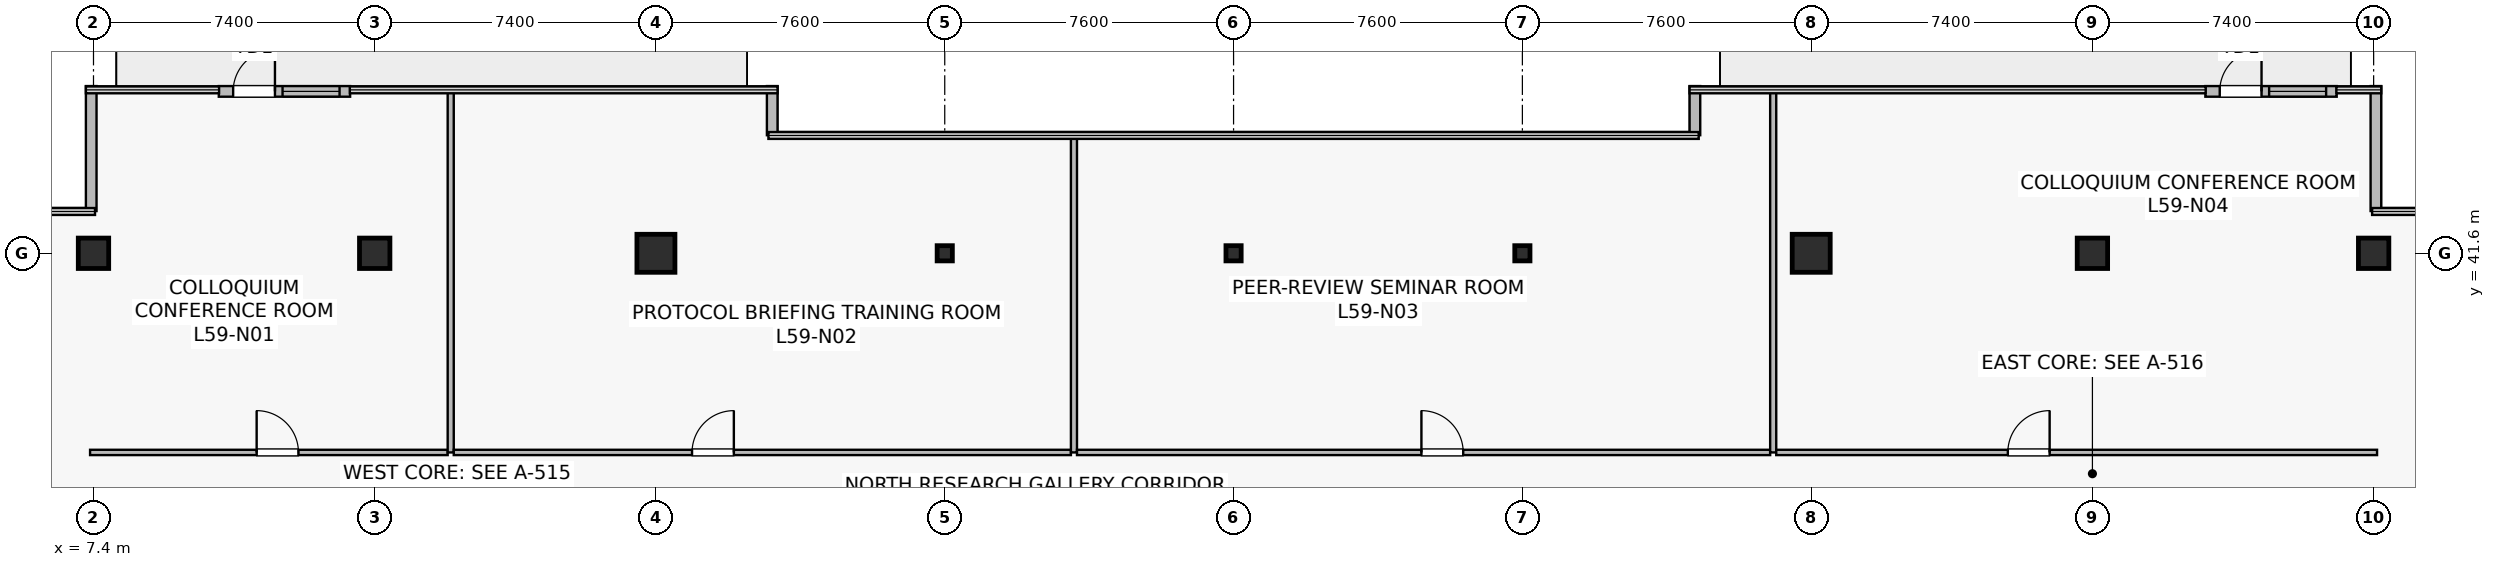
"""IFC4 building model, lengths in metres.
Left out: names, types, materials, properties, quantities, classifications, styles, units other than length and angle.
Written with IfcOpenShell. Run it as: python <this file> out.ifc"""

import sys

from ifc_helpers import new_model, si_unit, direction, frame, frame_2d, origin, origin_2d, place, context, subcontext, project, spatial, rectangle, hollow_rectangle, extrude, source, transform, mapped, element, fill, save


model = new_model("IFC4")
c1 = context("Model", 3, precision=1e-05, world=origin(), true_north=direction((0.0, 1.0)))
c2 = subcontext(c1, "Body", "Model", "MODEL_VIEW")
j1 = project(units=[si_unit("LENGTHUNIT", "METRE"), si_unit("PLANEANGLEUNIT", "RADIAN")], contexts=[c1])
p1 = place(None, origin())
s1 = spatial("IfcSite", under=j1, at=p1, CompositionType="ELEMENT")
p2 = place(p1, origin())
s2 = spatial("IfcBuilding", under=s1, at=p2, CompositionType="ELEMENT")
p3 = place(p2, frame((0.0, 0.0, 246.5)))
s3 = spatial("IfcBuildingStorey", under=s2, at=p3, CompositionType="ELEMENT", Elevation=246.5)
m1 = source(origin(), c2, "Body", "SweptSolid", [
    extrude(rectangle(XDim=0.8, YDim=0.8, at=origin_2d()), origin(), (0.0, 0.0, 1.0), 4.1),
])
p4 = place(p3, frame((14.8, 41.6, 0.0), z_axis=(0.0, 0.0, 1.0), x_axis=(1.0, 0.0, 0.0)))
e1 = element("IfcColumn", 1, at=p4, inside=s3, PredefinedType="COLUMN", context=c2, shape_type="MappedRepresentation", body=[
    mapped(m1, transform((0.0, 0.0, 0.0), scale=1.0)),
])
m2 = source(origin(), c2, "Body", "SweptSolid", [
    extrude(rectangle(XDim=1.0, YDim=1.0, at=origin_2d()), origin(), (0.0, 0.0, 1.0), 4.1),
])
for number, where, z_axis, x_axis in (
    (2, (22.2, 41.6, 0.0), (0.0, 0.0, 1.0), (1.0, 0.0, 0.0)),
    (3, (52.6, 41.6, 0.0), (0.0, 0.0, 1.0), (1.0, 0.0, 0.0)),
):
    element("IfcColumn", number, at=place(p3, frame(where, z_axis=z_axis, x_axis=x_axis)), inside=s3, PredefinedType="COLUMN", context=c2, shape_type="MappedRepresentation", body=[
        mapped(m2, transform((0.0, 0.0, 0.0), scale=1.0)),
    ])
for number, where, z_axis, x_axis in (
    (4, (60.0, 41.6, 0.0), (0.0, 0.0, 1.0), (1.0, 0.0, 0.0)),
    (5, (7.4, 41.6, 0.0), (0.0, 0.0, 1.0), (1.0, 0.0, 0.0)),
    (6, (67.4, 41.6, 0.0), (0.0, 0.0, 1.0), (1.0, 0.0, 0.0)),
):
    element("IfcColumn", number, at=place(p3, frame(where, z_axis=z_axis, x_axis=x_axis)), inside=s3, PredefinedType="COLUMN", context=c2, shape_type="MappedRepresentation", body=[
        mapped(m1, transform((0.0, 0.0, 0.0), scale=1.0)),
    ])
m3 = source(origin(), c2, "Body", "SweptSolid", [
    extrude(hollow_rectangle(XDim=0.4, YDim=0.4, WallThickness=0.019, at=origin_2d()), origin(), (0.0, 0.0, 1.0), 4.1),
])
for number, where, z_axis, x_axis in (
    (7, (29.8, 41.6, 0.0), (0.0, 0.0, 1.0), (1.0, 0.0, 0.0)),
    (8, (37.4, 41.6, 0.0), (0.0, 0.0, 1.0), (1.0, 0.0, 0.0)),
    (9, (45.0, 41.6, 0.0), (0.0, 0.0, 1.0), (1.0, 0.0, 0.0)),
):
    element("IfcColumn", number, at=place(p3, frame(where, z_axis=z_axis, x_axis=x_axis)), inside=s3, PredefinedType="COLUMN", context=c2, shape_type="MappedRepresentation", body=[
        mapped(m3, transform((0.0, 0.0, 0.0), scale=1.0)),
    ])
p5 = place(p3, frame((10.697, 45.86, 0.0), z_axis=(0.0, 0.0, 1.0), x_axis=(1.0, 0.0, 0.0)))
e10 = element("IfcWall", 10, at=p5, inside=s3, PredefinedType="STANDARD", context=c2, shape_type="SweptSolid", body=[
    extrude(rectangle(XDim=3.456, YDim=0.28, at=frame_2d((1.728, 0.0))), origin(), (0.0, 0.0, 1.0), 3.8),
])
p6 = place(p5, frame((0.378, 0.0, 0.0)))
e11 = element("IfcOpeningElement", 11, at=p6, cuts=e10, PredefinedType="OPENING", context=c2, shape_type="SweptSolid", body=[
    extrude(rectangle(XDim=1.1, YDim=2.2, at=frame_2d((0.55, 1.1))), frame((0.0, 0.15, 0.0), z_axis=(0.0, -1.0, 0.0), x_axis=(1.0, 0.0, 0.0)), (0.0, 0.0, 1.0), 0.3),
])
p7 = place(p5, frame((1.678, 0.0, 0.9)))
e12 = element("IfcOpeningElement", 12, at=p7, cuts=e10, PredefinedType="OPENING", context=c2, shape_type="SweptSolid", body=[
    extrude(rectangle(XDim=1.5, YDim=2.2, at=frame_2d((0.75, 1.1))), frame((0.0, 0.15, 0.0), z_axis=(0.0, -1.0, 0.0), x_axis=(1.0, 0.0, 0.0)), (0.0, 0.0, 1.0), 0.3),
])
p8 = place(p3, frame((62.972, 45.86, 0.0), z_axis=(0.0, 0.0, 1.0), x_axis=(1.0, 0.0, 0.0)))
e13 = element("IfcWall", 13, at=p8, inside=s3, PredefinedType="STANDARD", context=c2, shape_type="SweptSolid", body=[
    extrude(rectangle(XDim=3.456, YDim=0.28, at=frame_2d((1.728, 0.0))), origin(), (0.0, 0.0, 1.0), 3.8),
])
p9 = place(p8, frame((0.378, 0.0, 0.0)))
e14 = element("IfcOpeningElement", 14, at=p9, cuts=e13, PredefinedType="OPENING", context=c2, shape_type="SweptSolid", body=[
    extrude(rectangle(XDim=1.1, YDim=2.2, at=frame_2d((0.55, 1.1))), frame((0.0, 0.15, 0.0), z_axis=(0.0, -1.0, 0.0), x_axis=(1.0, 0.0, 0.0)), (0.0, 0.0, 1.0), 0.3),
])
p10 = place(p8, frame((1.678, 0.0, 0.9)))
e15 = element("IfcOpeningElement", 15, at=p10, cuts=e13, PredefinedType="OPENING", context=c2, shape_type="SweptSolid", body=[
    extrude(rectangle(XDim=1.5, YDim=2.2, at=frame_2d((0.75, 1.1))), frame((0.0, 0.15, 0.0), z_axis=(0.0, -1.0, 0.0), x_axis=(1.0, 0.0, 0.0)), (0.0, 0.0, 1.0), 0.3),
])
p11 = place(p3, frame((67.46, 42.712, 0.0), z_axis=(0.0, 0.0, 1.0), x_axis=(0.0, 1.0, 0.0)))
e16 = element("IfcWall", 16, at=p11, inside=s3, PredefinedType="STANDARD", context=c2, shape_type="SweptSolid", body=[
    extrude(rectangle(XDim=3.288, YDim=0.28, at=frame_2d((1.644, 0.0))), origin(), (0.0, 0.0, 1.0), 3.8),
])
for number, where, z_axis, x_axis in (
    (17, (49.54, 46.0, 0.0), (0.0, 0.0, 1.0), (0.0, -1.0, 0.0)),
    (18, (25.26, 44.707, 0.0), (0.0, 0.0, 1.0), (0.0, 1.0, 0.0)),
):
    element("IfcWall", number, at=place(p3, frame(where, z_axis=z_axis, x_axis=x_axis)), inside=s3, PredefinedType="STANDARD", context=c2, shape_type="SweptSolid", body=[
        extrude(rectangle(XDim=1.293, YDim=0.28, at=frame_2d((0.646, 0.0))), origin(), (0.0, 0.0, 1.0), 3.8),
    ])
p12 = place(p3, frame((7.34, 46.0, 0.0), z_axis=(0.0, 0.0, 1.0), x_axis=(0.0, -1.0, 0.0)))
e19 = element("IfcWall", 19, at=p12, inside=s3, PredefinedType="STANDARD", context=c2, shape_type="SweptSolid", body=[
    extrude(rectangle(XDim=3.288, YDim=0.28, at=frame_2d((1.644, 0.0))), origin(), (0.0, 0.0, 1.0), 3.8),
])
p13 = place(p3, frame((7.31, 36.36, 0.0), z_axis=(0.0, 0.0, 1.0), x_axis=(1.0, 0.0, 0.0)))
e20 = element("IfcWall", 20, at=p13, inside=s3, PredefinedType="PARTITIONING", context=c2, shape_type="SweptSolid", body=[
    extrude(rectangle(XDim=9.41, YDim=0.14, at=frame_2d((4.705, 0.0))), origin(), (0.0, 0.0, 1.0), 3.197),
])
p14 = place(p13, frame((4.383, 0.0, 0.0)))
e21 = element("IfcOpeningElement", 21, at=p14, cuts=e20, PredefinedType="OPENING", context=c2, shape_type="SweptSolid", body=[
    extrude(rectangle(XDim=1.1, YDim=2.18, at=frame_2d((0.55, 1.09))), frame((0.0, 0.08, 0.0), z_axis=(0.0, -1.0, 0.0), x_axis=(1.0, 0.0, 0.0)), (0.0, 0.0, 1.0), 0.16),
])
p15 = place(p3, frame((16.8, 36.36, 0.0), z_axis=(0.0, 0.0, 1.0), x_axis=(0.0, 1.0, 0.0)))
e22 = element("IfcWall", 22, at=p15, inside=s3, PredefinedType="PARTITIONING", context=c2, shape_type="SweptSolid", body=[
    extrude(rectangle(XDim=9.53, YDim=0.16, at=frame_2d((4.765, 0.0))), origin(), (0.0, 0.0, 1.0), 3.135),
])
p16 = place(p3, frame((16.88, 36.36, 0.0), z_axis=(0.0, 0.0, 1.0), x_axis=(1.0, 0.0, 0.0)))
e23 = element("IfcWall", 23, at=p16, inside=s3, PredefinedType="PARTITIONING", context=c2, shape_type="SweptSolid", body=[
    extrude(rectangle(XDim=16.24, YDim=0.14, at=frame_2d((8.12, 0.0))), origin(), (0.0, 0.0, 1.0), 3.197),
])
p17 = place(p16, frame((6.271, 0.0, 0.0)))
e24 = element("IfcOpeningElement", 24, at=p17, cuts=e23, PredefinedType="OPENING", context=c2, shape_type="SweptSolid", body=[
    extrude(rectangle(XDim=1.1, YDim=2.18, at=frame_2d((0.55, 1.09))), frame((0.0, 0.08, 0.0), z_axis=(0.0, -1.0, 0.0), x_axis=(1.0, 0.0, 0.0)), (0.0, 0.0, 1.0), 0.16),
])
p18 = place(p3, frame((33.2, 36.36, 0.0), z_axis=(0.0, 0.0, 1.0), x_axis=(0.0, 1.0, 0.0)))
e25 = element("IfcWall", 25, at=p18, inside=s3, PredefinedType="PARTITIONING", context=c2, shape_type="SweptSolid", body=[
    extrude(rectangle(XDim=8.33, YDim=0.16, at=frame_2d((4.165, 0.0))), origin(), (0.0, 0.0, 1.0), 3.135),
])
p19 = place(p3, frame((33.28, 36.36, 0.0), z_axis=(0.0, 0.0, 1.0), x_axis=(1.0, 0.0, 0.0)))
e26 = element("IfcWall", 26, at=p19, inside=s3, PredefinedType="PARTITIONING", context=c2, shape_type="SweptSolid", body=[
    extrude(rectangle(XDim=18.24, YDim=0.14, at=frame_2d((9.12, 0.0))), origin(), (0.0, 0.0, 1.0), 3.197),
])
p20 = place(p19, frame((9.063, 0.0, 0.0)))
e27 = element("IfcOpeningElement", 27, at=p20, cuts=e26, PredefinedType="OPENING", context=c2, shape_type="SweptSolid", body=[
    extrude(rectangle(XDim=1.1, YDim=2.18, at=frame_2d((0.55, 1.09))), frame((0.0, 0.08, 0.0), z_axis=(0.0, -1.0, 0.0), x_axis=(1.0, 0.0, 0.0)), (0.0, 0.0, 1.0), 0.16),
])
p21 = place(p3, frame((51.6, 36.36, 0.0), z_axis=(0.0, 0.0, 1.0), x_axis=(0.0, 1.0, 0.0)))
e28 = element("IfcWall", 28, at=p21, inside=s3, PredefinedType="PARTITIONING", context=c2, shape_type="SweptSolid", body=[
    extrude(rectangle(XDim=9.53, YDim=0.16, at=frame_2d((4.765, 0.0))), origin(), (0.0, 0.0, 1.0), 3.135),
])
p22 = place(p3, frame((51.68, 36.36, 0.0), z_axis=(0.0, 0.0, 1.0), x_axis=(1.0, 0.0, 0.0)))
e29 = element("IfcWall", 29, at=p22, inside=s3, PredefinedType="PARTITIONING", context=c2, shape_type="SweptSolid", body=[
    extrude(rectangle(XDim=15.81, YDim=0.14, at=frame_2d((7.905, 0.0))), origin(), (0.0, 0.0, 1.0), 3.197),
])
p23 = place(p22, frame((6.094, 0.0, 0.0)))
e30 = element("IfcOpeningElement", 30, at=p23, cuts=e29, PredefinedType="OPENING", context=c2, shape_type="SweptSolid", body=[
    extrude(rectangle(XDim=1.1, YDim=2.18, at=frame_2d((0.55, 1.09))), frame((0.0, 0.08, 0.0), z_axis=(0.0, -1.0, 0.0), x_axis=(1.0, 0.0, 0.0)), (0.0, 0.0, 1.0), 0.16),
])
m4 = source(origin(), c2, "Body", "SweptSolid", [
    extrude(rectangle(XDim=1.1, YDim=2.2, at=frame_2d((0.55, 1.1))), frame((0.0, 0.025, 0.0), z_axis=(0.0, -1.0, 0.0), x_axis=(1.0, 0.0, 0.0)), (0.0, 0.0, 1.0), 0.05),
])
p24 = place(p6, origin())
e31 = element("IfcDoor", 31, at=p24, inside=s3, OperationType="SINGLE_SWING_RIGHT", PredefinedType="DOOR", context=c2, shape_type="MappedRepresentation", body=[
    mapped(m4, transform((0.0, 0.0, 0.0), scale=1.0)),
])
fill(e11, e31)
m5 = source(origin(), c2, "Body", "SweptSolid", [
    extrude(rectangle(XDim=1.5, YDim=2.2, at=frame_2d((0.75, 1.1))), frame((0.0, 0.03, 0.0), z_axis=(0.0, -1.0, 0.0), x_axis=(1.0, 0.0, 0.0)), (0.0, 0.0, 1.0), 0.06),
])
p25 = place(p7, origin())
e32 = element("IfcWindow", 32, at=p25, inside=s3, PartitioningType="SINGLE_PANEL", PredefinedType="WINDOW", context=c2, shape_type="MappedRepresentation", body=[
    mapped(m5, transform((0.0, 0.0, 0.0), scale=1.0)),
])
fill(e12, e32)
p26 = place(p9, origin())
e33 = element("IfcDoor", 33, at=p26, inside=s3, OperationType="SINGLE_SWING_RIGHT", PredefinedType="DOOR", context=c2, shape_type="MappedRepresentation", body=[
    mapped(m4, transform((0.0, 0.0, 0.0), scale=1.0)),
])
fill(e14, e33)
p27 = place(p10, origin())
e34 = element("IfcWindow", 34, at=p27, inside=s3, PartitioningType="SINGLE_PANEL", PredefinedType="WINDOW", context=c2, shape_type="MappedRepresentation", body=[
    mapped(m5, transform((0.0, 0.0, 0.0), scale=1.0)),
])
fill(e15, e34)
m6 = source(origin(), c2, "Body", "SweptSolid", [
    extrude(rectangle(XDim=1.1, YDim=2.18, at=frame_2d((0.55, 1.09))), frame((0.0, 0.025, 0.0), z_axis=(0.0, -1.0, 0.0), x_axis=(1.0, 0.0, 0.0)), (0.0, 0.0, 1.0), 0.05),
])
p28 = place(p14, origin())
e35 = element("IfcDoor", 35, at=p28, inside=s3, OperationType="SINGLE_SWING_LEFT", PredefinedType="DOOR", context=c2, shape_type="MappedRepresentation", body=[
    mapped(m6, transform((0.0, 0.0, 0.0), scale=1.0)),
])
fill(e21, e35)
p29 = place(p17, origin())
e36 = element("IfcDoor", 36, at=p29, inside=s3, OperationType="SINGLE_SWING_RIGHT", PredefinedType="DOOR", context=c2, shape_type="MappedRepresentation", body=[
    mapped(m6, transform((0.0, 0.0, 0.0), scale=1.0)),
])
fill(e24, e36)
p30 = place(p20, origin())
e37 = element("IfcDoor", 37, at=p30, inside=s3, OperationType="SINGLE_SWING_LEFT", PredefinedType="DOOR", context=c2, shape_type="MappedRepresentation", body=[
    mapped(m6, transform((0.0, 0.0, 0.0), scale=1.0)),
])
fill(e27, e37)
p31 = place(p23, origin())
e38 = element("IfcDoor", 38, at=p31, inside=s3, OperationType="SINGLE_SWING_RIGHT", PredefinedType="DOOR", context=c2, shape_type="MappedRepresentation", body=[
    mapped(m6, transform((0.0, 0.0, 0.0), scale=1.0)),
])
fill(e30, e38)
save(model, sys.argv[1])
